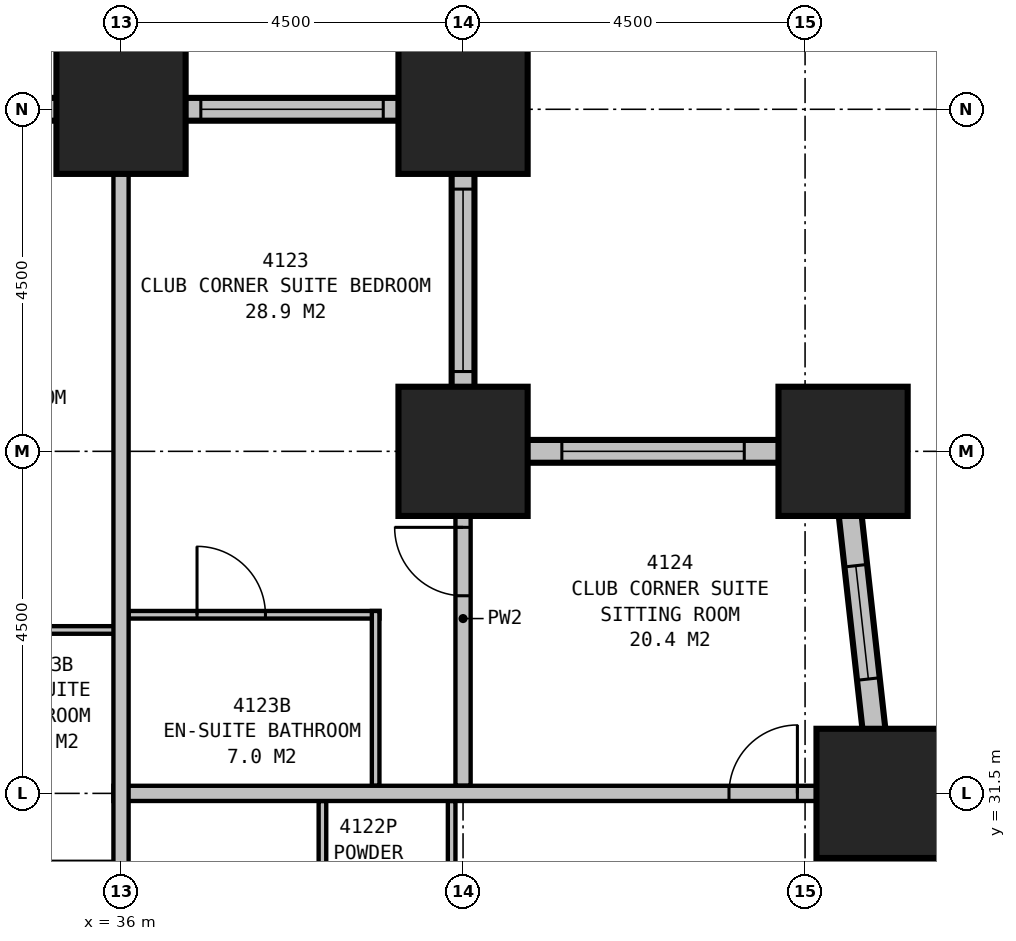
"""IFC4 building model, lengths in metres.
Left out: names, types, materials, properties, quantities, classifications, styles, units other than length and angle.
Written with IfcOpenShell. Run it as: python <this file> out.ifc"""

import sys

from ifc_helpers import new_model, si_unit, direction, frame, frame_2d, origin, origin_2d, place, context, subcontext, project, spatial, rectangle, extrude, element, fill, save


model = new_model("IFC4")
c1 = context("Model", 3, precision=1e-05, world=origin(), true_north=direction((0.0, 1.0)))
c2 = subcontext(c1, "Body", "Model", "MODEL_VIEW")
j1 = project(units=[si_unit("LENGTHUNIT", "METRE"), si_unit("PLANEANGLEUNIT", "RADIAN")], contexts=[c1])
p1 = place(None, origin())
s1 = spatial("IfcSite", under=j1, at=p1, CompositionType="ELEMENT")
p2 = place(p1, origin())
s2 = spatial("IfcBuilding", under=s1, at=p2, CompositionType="ELEMENT")
p3 = place(p2, frame((0.0, 0.0, 162.4)))
s3 = spatial("IfcBuildingStorey", under=s2, at=p3, CompositionType="ELEMENT", Elevation=162.4)
for number, where, z_axis, x_axis in (
    (1, (46.0, 31.5, 0.0), (0.0, 0.0, 1.0), (1.0, 0.0, 0.0)),
    (2, (45.5, 36.0, 0.0), (0.0, 0.0, 1.0), (1.0, 0.0, 0.0)),
    (3, (40.5, 36.0, 0.0), (0.0, 0.0, 1.0), (1.0, 0.0, 0.0)),
    (4, (40.5, 40.5, 0.0), (0.0, 0.0, 1.0), (1.0, 0.0, 0.0)),
    (5, (36.0, 40.5, 0.0), (0.0, 0.0, 1.0), (1.0, 0.0, 0.0)),
):
    element("IfcColumn", number, at=place(p3, frame(where, z_axis=z_axis, x_axis=x_axis)), inside=s3, PredefinedType="COLUMN", context=c2, shape_type="SweptSolid", body=[
        extrude(rectangle(XDim=1.7, YDim=1.7, at=origin_2d()), origin(), (0.0, 0.0, 1.0), 3.5),
    ])
p4 = place(p3, frame((49.017, 4.351, 0.0), z_axis=(0.0, 0.0, 1.0), x_axis=(-0.110433201132, 0.993883548555, 0.0)))
e6 = element("IfcWall", 6, at=p4, inside=s3, PredefinedType="STANDARD", context=c2, shape_type="SweptSolid", body=[
    extrude(rectangle(XDim=31.994, YDim=0.3, at=frame_2d((15.997, 0.0))), origin(), (0.0, 0.0, 1.0), 2.25),
])
p5 = place(p4, frame((1.664, 0.0, 0.5)))
e7 = element("IfcOpeningElement", 7, at=p5, cuts=e6, PredefinedType="OPENING", context=c2, shape_type="SweptSolid", body=[
    extrude(rectangle(XDim=1.5, YDim=1.6, at=frame_2d((0.75, 0.8))), frame((0.0, 0.16, 0.0), z_axis=(0.0, -1.0, 0.0), x_axis=(1.0, 0.0, 0.0)), (0.0, 0.0, 1.0), 0.32),
])
p6 = place(p4, frame((6.192, 0.0, 0.5)))
e8 = element("IfcOpeningElement", 8, at=p6, cuts=e6, PredefinedType="OPENING", context=c2, shape_type="SweptSolid", body=[
    extrude(rectangle(XDim=1.5, YDim=1.6, at=frame_2d((0.75, 0.8))), frame((0.0, 0.16, 0.0), z_axis=(0.0, -1.0, 0.0), x_axis=(1.0, 0.0, 0.0)), (0.0, 0.0, 1.0), 0.32),
])
p7 = place(p4, frame((10.719, 0.0, 0.5)))
e9 = element("IfcOpeningElement", 9, at=p7, cuts=e6, PredefinedType="OPENING", context=c2, shape_type="SweptSolid", body=[
    extrude(rectangle(XDim=1.5, YDim=1.6, at=frame_2d((0.75, 0.8))), frame((0.0, 0.16, 0.0), z_axis=(0.0, -1.0, 0.0), x_axis=(1.0, 0.0, 0.0)), (0.0, 0.0, 1.0), 0.32),
])
p8 = place(p4, frame((15.247, 0.0, 0.5)))
e10 = element("IfcOpeningElement", 10, at=p8, cuts=e6, PredefinedType="OPENING", context=c2, shape_type="SweptSolid", body=[
    extrude(rectangle(XDim=1.5, YDim=1.6, at=frame_2d((0.75, 0.8))), frame((0.0, 0.16, 0.0), z_axis=(0.0, -1.0, 0.0), x_axis=(1.0, 0.0, 0.0)), (0.0, 0.0, 1.0), 0.32),
])
p9 = place(p4, frame((19.775, 0.0, 0.5)))
e11 = element("IfcOpeningElement", 11, at=p9, cuts=e6, PredefinedType="OPENING", context=c2, shape_type="SweptSolid", body=[
    extrude(rectangle(XDim=1.5, YDim=1.6, at=frame_2d((0.75, 0.8))), frame((0.0, 0.16, 0.0), z_axis=(0.0, -1.0, 0.0), x_axis=(1.0, 0.0, 0.0)), (0.0, 0.0, 1.0), 0.32),
])
p10 = place(p4, frame((24.302, 0.0, 0.5)))
e12 = element("IfcOpeningElement", 12, at=p10, cuts=e6, PredefinedType="OPENING", context=c2, shape_type="SweptSolid", body=[
    extrude(rectangle(XDim=1.5, YDim=1.6, at=frame_2d((0.75, 0.8))), frame((0.0, 0.16, 0.0), z_axis=(0.0, -1.0, 0.0), x_axis=(1.0, 0.0, 0.0)), (0.0, 0.0, 1.0), 0.32),
])
p11 = place(p4, frame((28.83, 0.0, 0.5)))
e13 = element("IfcOpeningElement", 13, at=p11, cuts=e6, PredefinedType="OPENING", context=c2, shape_type="SweptSolid", body=[
    extrude(rectangle(XDim=1.5, YDim=1.6, at=frame_2d((0.75, 0.8))), frame((0.0, 0.16, 0.0), z_axis=(0.0, -1.0, 0.0), x_axis=(1.0, 0.0, 0.0)), (0.0, 0.0, 1.0), 0.32),
])
p12 = place(p3, frame((45.65, 36.0, 0.0), z_axis=(0.0, 0.0, 1.0), x_axis=(-1.0, 0.0, 0.0)))
e14 = element("IfcWall", 14, at=p12, inside=s3, PredefinedType="STANDARD", context=c2, shape_type="SweptSolid", body=[
    extrude(rectangle(XDim=5.3, YDim=0.3, at=frame_2d((2.65, 0.0))), origin(), (0.0, 0.0, 1.0), 2.25),
])
p13 = place(p12, frame((1.45, 0.0, 0.5)))
e15 = element("IfcOpeningElement", 15, at=p13, cuts=e14, PredefinedType="OPENING", context=c2, shape_type="SweptSolid", body=[
    extrude(rectangle(XDim=2.4, YDim=1.6, at=frame_2d((1.2, 0.8))), frame((0.0, 0.16, 0.0), z_axis=(0.0, -1.0, 0.0), x_axis=(1.0, 0.0, 0.0)), (0.0, 0.0, 1.0), 0.32),
])
p14 = place(p3, frame((40.5, 35.85, 0.0), z_axis=(0.0, 0.0, 1.0), x_axis=(0.0, 1.0, 0.0)))
e16 = element("IfcWall", 16, at=p14, inside=s3, PredefinedType="STANDARD", context=c2, shape_type="SweptSolid", body=[
    extrude(rectangle(XDim=4.8, YDim=0.3, at=frame_2d((2.4, 0.0))), origin(), (0.0, 0.0, 1.0), 2.25),
])
p15 = place(p14, frame((1.2, 0.0, 0.5)))
e17 = element("IfcOpeningElement", 17, at=p15, cuts=e16, PredefinedType="OPENING", context=c2, shape_type="SweptSolid", body=[
    extrude(rectangle(XDim=2.4, YDim=1.6, at=frame_2d((1.2, 0.8))), frame((0.0, 0.16, 0.0), z_axis=(0.0, -1.0, 0.0), x_axis=(1.0, 0.0, 0.0)), (0.0, 0.0, 1.0), 0.32),
])
p16 = place(p3, frame((40.65, 40.5, 0.0), z_axis=(0.0, 0.0, 1.0), x_axis=(-1.0, 0.0, 0.0)))
e18 = element("IfcWall", 18, at=p16, inside=s3, PredefinedType="STANDARD", context=c2, shape_type="SweptSolid", body=[
    extrude(rectangle(XDim=31.8, YDim=0.3, at=frame_2d((15.9, 0.0))), origin(), (0.0, 0.0, 1.0), 2.25),
])
p17 = place(p16, frame((1.2, 0.0, 0.5)))
e19 = element("IfcOpeningElement", 19, at=p17, cuts=e18, PredefinedType="OPENING", context=c2, shape_type="SweptSolid", body=[
    extrude(rectangle(XDim=2.4, YDim=1.6, at=frame_2d((1.2, 0.8))), frame((0.0, 0.16, 0.0), z_axis=(0.0, -1.0, 0.0), x_axis=(1.0, 0.0, 0.0)), (0.0, 0.0, 1.0), 0.32),
])
p18 = place(p16, frame((5.7, 0.0, 0.5)))
e20 = element("IfcOpeningElement", 20, at=p18, cuts=e18, PredefinedType="OPENING", context=c2, shape_type="SweptSolid", body=[
    extrude(rectangle(XDim=2.4, YDim=1.6, at=frame_2d((1.2, 0.8))), frame((0.0, 0.16, 0.0), z_axis=(0.0, -1.0, 0.0), x_axis=(1.0, 0.0, 0.0)), (0.0, 0.0, 1.0), 0.32),
])
p19 = place(p16, frame((10.2, 0.0, 0.5)))
e21 = element("IfcOpeningElement", 21, at=p19, cuts=e18, PredefinedType="OPENING", context=c2, shape_type="SweptSolid", body=[
    extrude(rectangle(XDim=2.4, YDim=1.6, at=frame_2d((1.2, 0.8))), frame((0.0, 0.16, 0.0), z_axis=(0.0, -1.0, 0.0), x_axis=(1.0, 0.0, 0.0)), (0.0, 0.0, 1.0), 0.32),
])
p20 = place(p16, frame((14.7, 0.0, 0.5)))
e22 = element("IfcOpeningElement", 22, at=p20, cuts=e18, PredefinedType="OPENING", context=c2, shape_type="SweptSolid", body=[
    extrude(rectangle(XDim=2.4, YDim=1.6, at=frame_2d((1.2, 0.8))), frame((0.0, 0.16, 0.0), z_axis=(0.0, -1.0, 0.0), x_axis=(1.0, 0.0, 0.0)), (0.0, 0.0, 1.0), 0.32),
])
p21 = place(p16, frame((19.2, 0.0, 0.5)))
e23 = element("IfcOpeningElement", 23, at=p21, cuts=e18, PredefinedType="OPENING", context=c2, shape_type="SweptSolid", body=[
    extrude(rectangle(XDim=2.4, YDim=1.6, at=frame_2d((1.2, 0.8))), frame((0.0, 0.16, 0.0), z_axis=(0.0, -1.0, 0.0), x_axis=(1.0, 0.0, 0.0)), (0.0, 0.0, 1.0), 0.32),
])
p22 = place(p16, frame((23.7, 0.0, 0.5)))
e24 = element("IfcOpeningElement", 24, at=p22, cuts=e18, PredefinedType="OPENING", context=c2, shape_type="SweptSolid", body=[
    extrude(rectangle(XDim=2.4, YDim=1.6, at=frame_2d((1.2, 0.8))), frame((0.0, 0.16, 0.0), z_axis=(0.0, -1.0, 0.0), x_axis=(1.0, 0.0, 0.0)), (0.0, 0.0, 1.0), 0.32),
])
p23 = place(p16, frame((28.2, 0.0, 0.5)))
e25 = element("IfcOpeningElement", 25, at=p23, cuts=e18, PredefinedType="OPENING", context=c2, shape_type="SweptSolid", body=[
    extrude(rectangle(XDim=2.4, YDim=1.6, at=frame_2d((1.2, 0.8))), frame((0.0, 0.16, 0.0), z_axis=(0.0, -1.0, 0.0), x_axis=(1.0, 0.0, 0.0)), (0.0, 0.0, 1.0), 0.32),
])
p24 = place(p3, frame((33.2, 33.65, 0.0), z_axis=(0.0, 0.0, 1.0), x_axis=(1.0, 0.0, 0.0)))
e26 = element("IfcWall", 26, at=p24, inside=s3, PredefinedType="PLUMBINGWALL", context=c2, shape_type="SweptSolid", body=[
    extrude(rectangle(XDim=2.8, YDim=0.1, at=frame_2d((1.4, 0.0))), origin(), (0.0, 0.0, 1.0), 3.25),
])
p25 = place(p3, frame((36.0, 29.3, 0.0), z_axis=(0.0, 0.0, 1.0), x_axis=(0.0, 1.0, 0.0)))
e27 = element("IfcWall", 27, at=p25, inside=s3, PredefinedType="PARTITIONING", context=c2, shape_type="SweptSolid", body=[
    extrude(rectangle(XDim=11.2, YDim=0.2, at=frame_2d((5.6, 0.0))), origin(), (0.0, 0.0, 1.0), 2.25),
])
p26 = place(p3, frame((35.9, 31.5, 0.0), z_axis=(0.0, 0.0, 1.0), x_axis=(1.0, 0.0, 0.0)))
e28 = element("IfcWall", 28, at=p26, inside=s3, PredefinedType="PARTITIONING", context=c2, shape_type="SweptSolid", body=[
    extrude(rectangle(XDim=10.099, YDim=0.2, at=frame_2d((5.05, 0.0))), origin(), (0.0, 0.0, 1.0), 3.25),
])
p27 = place(p26, frame((8.099, 0.0, 0.0)))
e29 = element("IfcOpeningElement", 29, at=p27, cuts=e28, PredefinedType="OPENING", context=c2, shape_type="SweptSolid", body=[
    extrude(rectangle(XDim=0.9, YDim=2.1, at=frame_2d((0.45, 1.05))), frame((0.0, 0.11, 0.0), z_axis=(0.0, -1.0, 0.0), x_axis=(1.0, 0.0, 0.0)), (0.0, 0.0, 1.0), 0.22),
])
p28 = place(p3, frame((40.35, 31.4, 0.0), z_axis=(0.0, 0.0, 1.0), x_axis=(0.0, -1.0, 0.0)))
e30 = element("IfcWall", 30, at=p28, inside=s3, PredefinedType="PLUMBINGWALL", context=c2, shape_type="SweptSolid", body=[
    extrude(rectangle(XDim=2.0, YDim=0.1, at=frame_2d((1.0, 0.0))), origin(), (0.0, 0.0, 1.0), 2.25),
])
p29 = place(p3, frame((38.65, 31.4, 0.0), z_axis=(0.0, 0.0, 1.0), x_axis=(0.0, -1.0, 0.0)))
e31 = element("IfcWall", 31, at=p29, inside=s3, PredefinedType="PLUMBINGWALL", context=c2, shape_type="SweptSolid", body=[
    extrude(rectangle(XDim=2.0, YDim=0.1, at=frame_2d((1.0, 0.0))), origin(), (0.0, 0.0, 1.0), 3.25),
])
p30 = place(p3, frame((40.5, 31.6, 0.0), z_axis=(0.0, 0.0, 1.0), x_axis=(0.0, 1.0, 0.0)))
e32 = element("IfcWall", 32, at=p30, inside=s3, PredefinedType="PARTITIONING", context=c2, shape_type="SweptSolid", body=[
    extrude(rectangle(XDim=4.4, YDim=0.2, at=frame_2d((2.2, 0.0))), origin(), (0.0, 0.0, 1.0), 2.25),
])
p31 = place(p30, frame((2.5, 0.0, 0.0)))
e33 = element("IfcOpeningElement", 33, at=p31, cuts=e32, PredefinedType="OPENING", context=c2, shape_type="SweptSolid", body=[
    extrude(rectangle(XDim=0.9, YDim=2.1, at=frame_2d((0.45, 1.05))), frame((0.0, 0.11, 0.0), z_axis=(0.0, -1.0, 0.0), x_axis=(1.0, 0.0, 0.0)), (0.0, 0.0, 1.0), 0.22),
])
p32 = place(p3, frame((39.35, 31.6, 0.0), z_axis=(0.0, 0.0, 1.0), x_axis=(0.0, 1.0, 0.0)))
e34 = element("IfcWall", 34, at=p32, inside=s3, PredefinedType="PLUMBINGWALL", context=c2, shape_type="SweptSolid", body=[
    extrude(rectangle(XDim=2.3, YDim=0.1, at=frame_2d((1.15, 0.0))), origin(), (0.0, 0.0, 1.0), 3.25),
])
p33 = place(p3, frame((36.1, 33.85, 0.0), z_axis=(0.0, 0.0, 1.0), x_axis=(1.0, 0.0, 0.0)))
e35 = element("IfcWall", 35, at=p33, inside=s3, PredefinedType="PLUMBINGWALL", context=c2, shape_type="SweptSolid", body=[
    extrude(rectangle(XDim=3.3, YDim=0.1, at=frame_2d((1.65, 0.0))), origin(), (0.0, 0.0, 1.0), 3.25),
])
p34 = place(p33, frame((0.9, 0.0, 0.0)))
e36 = element("IfcOpeningElement", 36, at=p34, cuts=e35, PredefinedType="OPENING", context=c2, shape_type="SweptSolid", body=[
    extrude(rectangle(XDim=0.9, YDim=2.1, at=frame_2d((0.45, 1.05))), frame((0.0, 0.06, 0.0), z_axis=(0.0, -1.0, 0.0), x_axis=(1.0, 0.0, 0.0)), (0.0, 0.0, 1.0), 0.12),
])
p35 = place(p11, origin())
e37 = element("IfcWindow", 37, at=p35, inside=s3, PartitioningType="SINGLE_PANEL", PredefinedType="WINDOW", context=c2, shape_type="SweptSolid", body=[
    extrude(rectangle(XDim=1.5, YDim=1.6, at=frame_2d((0.75, 0.8))), frame((0.0, 0.03, 0.0), z_axis=(0.0, -1.0, 0.0), x_axis=(1.0, 0.0, 0.0)), (0.0, 0.0, 1.0), 0.06),
])
fill(e13, e37)
p36 = place(p13, origin())
e38 = element("IfcWindow", 38, at=p36, inside=s3, PartitioningType="SINGLE_PANEL", PredefinedType="WINDOW", context=c2, shape_type="SweptSolid", body=[
    extrude(rectangle(XDim=2.4, YDim=1.6, at=frame_2d((1.2, 0.8))), frame((0.0, 0.03, 0.0), z_axis=(0.0, -1.0, 0.0), x_axis=(1.0, 0.0, 0.0)), (0.0, 0.0, 1.0), 0.06),
])
fill(e15, e38)
p37 = place(p15, origin())
e39 = element("IfcWindow", 39, at=p37, inside=s3, PartitioningType="SINGLE_PANEL", PredefinedType="WINDOW", context=c2, shape_type="SweptSolid", body=[
    extrude(rectangle(XDim=2.4, YDim=1.6, at=frame_2d((1.2, 0.8))), frame((0.0, 0.03, 0.0), z_axis=(0.0, -1.0, 0.0), x_axis=(1.0, 0.0, 0.0)), (0.0, 0.0, 1.0), 0.06),
])
fill(e17, e39)
p38 = place(p17, origin())
e40 = element("IfcWindow", 40, at=p38, inside=s3, PartitioningType="SINGLE_PANEL", PredefinedType="WINDOW", context=c2, shape_type="SweptSolid", body=[
    extrude(rectangle(XDim=2.4, YDim=1.6, at=frame_2d((1.2, 0.8))), frame((0.0, 0.03, 0.0), z_axis=(0.0, -1.0, 0.0), x_axis=(1.0, 0.0, 0.0)), (0.0, 0.0, 1.0), 0.06),
])
fill(e19, e40)
p39 = place(p27, origin())
e41 = element("IfcDoor", 41, at=p39, inside=s3, OperationType="SINGLE_SWING_RIGHT", PredefinedType="DOOR", context=c2, shape_type="SweptSolid", body=[
    extrude(rectangle(XDim=0.9, YDim=2.1, at=frame_2d((0.45, 1.05))), frame((0.0, 0.025, 0.0), z_axis=(0.0, -1.0, 0.0), x_axis=(1.0, 0.0, 0.0)), (0.0, 0.0, 1.0), 0.05),
])
fill(e29, e41)
p40 = place(p31, origin())
e42 = element("IfcDoor", 42, at=p40, inside=s3, OperationType="SINGLE_SWING_RIGHT", PredefinedType="DOOR", context=c2, shape_type="SweptSolid", body=[
    extrude(rectangle(XDim=0.9, YDim=2.1, at=frame_2d((0.45, 1.05))), frame((0.0, 0.025, 0.0), z_axis=(0.0, -1.0, 0.0), x_axis=(1.0, 0.0, 0.0)), (0.0, 0.0, 1.0), 0.05),
])
fill(e33, e42)
p41 = place(p34, origin())
e43 = element("IfcDoor", 43, at=p41, inside=s3, OperationType="SINGLE_SWING_LEFT", PredefinedType="DOOR", context=c2, shape_type="SweptSolid", body=[
    extrude(rectangle(XDim=0.9, YDim=2.1, at=frame_2d((0.45, 1.05))), frame((0.0, 0.025, 0.0), z_axis=(0.0, -1.0, 0.0), x_axis=(1.0, 0.0, 0.0)), (0.0, 0.0, 1.0), 0.05),
])
fill(e36, e43)
save(model, sys.argv[1])
